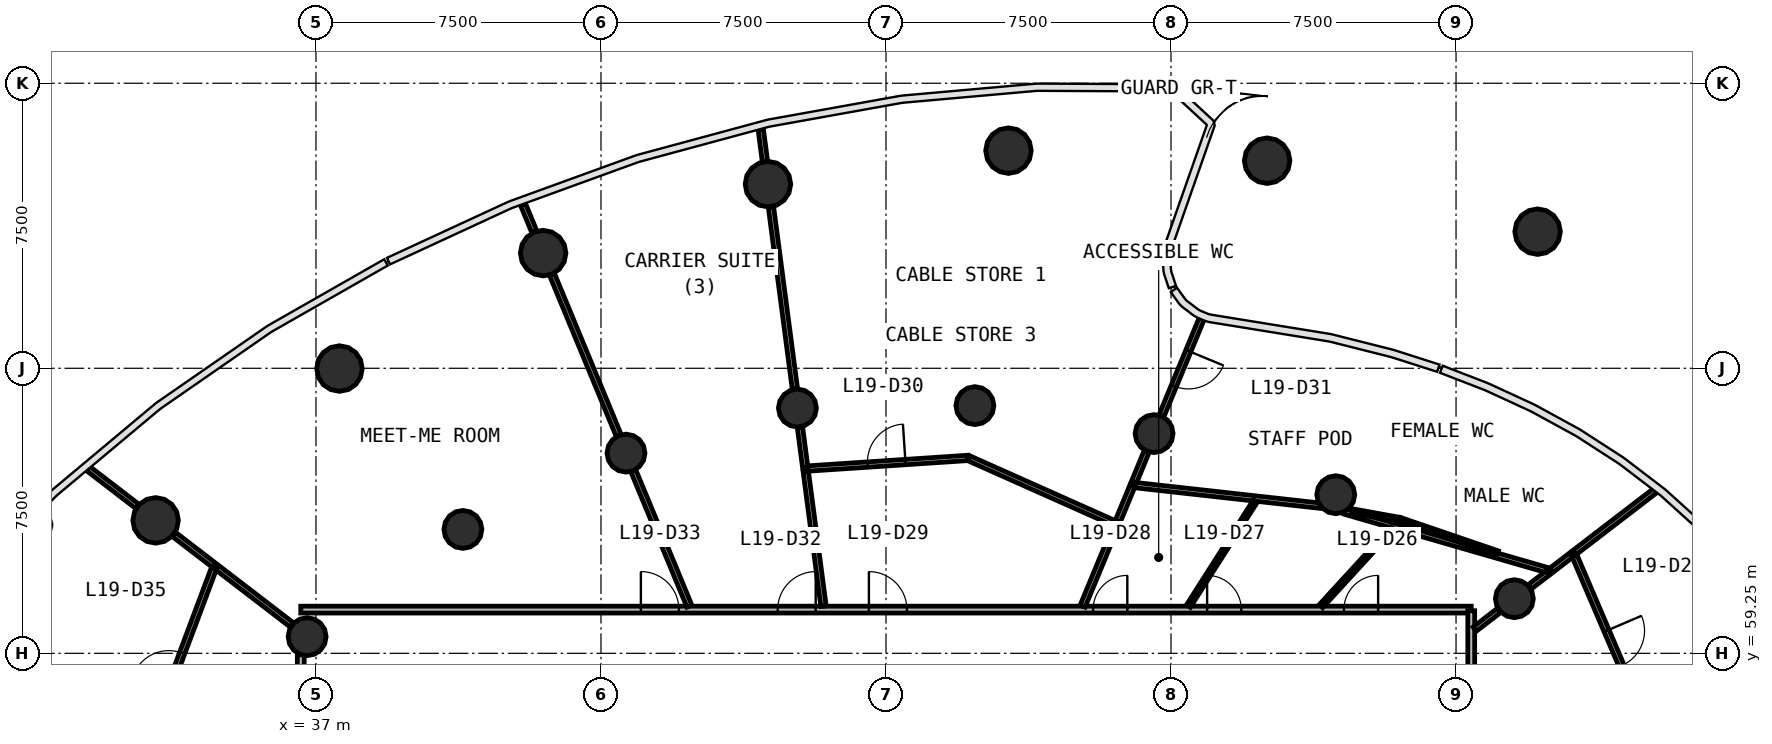
"""IFC4 building model, lengths in metres.
Left out: names, types, materials, properties, quantities, classifications, styles, units other than length and angle.
Written with IfcOpenShell. Run it as: python <this file> out.ifc"""

import sys

from ifc_helpers import new_model, si_unit, direction, frame, frame_2d, origin, origin_2d, place, context, subcontext, project, spatial, rectangle, circle, extrude, source, transform, mapped, element, fill, save


model = new_model("IFC4")
c1 = context("Model", 3, precision=1e-05, world=origin(), true_north=direction((0.0, 1.0)))
c2 = subcontext(c1, "Body", "Model", "MODEL_VIEW")
j1 = project(units=[si_unit("LENGTHUNIT", "METRE"), si_unit("PLANEANGLEUNIT", "RADIAN")], contexts=[c1])
p1 = place(None, origin())
s1 = spatial("IfcSite", under=j1, at=p1, CompositionType="ELEMENT")
p2 = place(p1, origin())
s2 = spatial("IfcBuilding", under=s1, at=p2, CompositionType="ELEMENT")
p3 = place(p2, frame((0.0, 0.0, 83.9)))
s3 = spatial("IfcBuildingStorey", under=s2, at=p3, CompositionType="ELEMENT", Elevation=83.9)
m1 = source(origin(), c2, "Body", "SweptSolid", [
    extrude(circle(Radius=0.6, at=origin_2d()), origin(), (0.0, 0.0, 1.0), 4.1),
])
for number, where, z_axis, x_axis in (
    (1, (69.146, 70.345, 0.0), (0.0, 0.0, 1.0), (1.0, 0.0, 0.0)),
    (2, (62.029, 72.212, 0.0), (0.0, 0.0, 1.0), (1.0, 0.0, 0.0)),
    (3, (55.222, 72.477, 0.0), (0.0, 0.0, 1.0), (1.0, 0.0, 0.0)),
    (4, (48.894, 71.595, 0.0), (0.0, 0.0, 1.0), (1.0, 0.0, 0.0)),
    (5, (42.978, 69.781, 0.0), (0.0, 0.0, 1.0), (1.0, 0.0, 0.0)),
    (6, (37.618, 66.743, 0.0), (0.0, 0.0, 1.0), (1.0, 0.0, 0.0)),
    (7, (32.78, 62.748, 0.0), (0.0, 0.0, 1.0), (1.0, 0.0, 0.0)),
):
    element("IfcColumn", number, at=place(p3, frame(where, z_axis=z_axis, x_axis=x_axis)), inside=s3, PredefinedType="COLUMN", context=c2, shape_type="MappedRepresentation", body=[
        mapped(m1, transform((0.0, 0.0, 0.0), scale=1.0)),
    ])
m2 = source(origin(), c2, "Body", "SweptSolid", [
    extrude(circle(Radius=0.5, at=origin_2d()), origin(), (0.0, 0.0, 1.0), 4.1),
])
for number, where, z_axis, x_axis in (
    (8, (68.535, 60.688, 0.0), (0.0, 0.0, 1.0), (1.0, 0.0, 0.0)),
    (9, (63.835, 63.424, 0.0), (0.0, 0.0, 1.0), (1.0, 0.0, 0.0)),
    (10, (59.055, 65.031, 0.0), (0.0, 0.0, 1.0), (1.0, 0.0, 0.0)),
    (11, (54.339, 65.767, 0.0), (0.0, 0.0, 1.0), (1.0, 0.0, 0.0)),
    (12, (49.669, 65.703, 0.0), (0.0, 0.0, 1.0), (1.0, 0.0, 0.0)),
    (13, (45.158, 64.518, 0.0), (0.0, 0.0, 1.0), (1.0, 0.0, 0.0)),
    (14, (40.866, 62.51, 0.0), (0.0, 0.0, 1.0), (1.0, 0.0, 0.0)),
    (15, (36.768, 59.688, 0.0), (0.0, 0.0, 1.0), (1.0, 0.0, 0.0)),
):
    element("IfcColumn", number, at=place(p3, frame(where, z_axis=z_axis, x_axis=x_axis)), inside=s3, PredefinedType="COLUMN", context=c2, shape_type="MappedRepresentation", body=[
        mapped(m2, transform((0.0, 0.0, 0.0), scale=1.0)),
    ])
p4 = place(p3, frame((36.6, 60.4, 0.0), z_axis=(0.0, 0.0, 1.0), x_axis=(1.0, 0.0, 0.0)))
e16 = element("IfcWall", 16, at=p4, inside=s3, PredefinedType="PARTITIONING", context=c2, shape_type="SweptSolid", body=[
    extrude(rectangle(XDim=30.8, YDim=0.18, at=frame_2d((15.4, 0.0))), origin(), (0.0, 0.0, 1.0), 2.9),
])
p5 = place(p4, frame((27.45, 0.0, 0.0)))
e17 = element("IfcOpeningElement", 17, at=p5, cuts=e16, PredefinedType="OPENING", context=c2, shape_type="SweptSolid", body=[
    extrude(rectangle(XDim=0.9, YDim=2.1, at=frame_2d((0.45, 1.05))), frame((0.0, 0.1, 0.0), z_axis=(0.0, -1.0, 0.0), x_axis=(1.0, 0.0, 0.0)), (0.0, 0.0, 1.0), 0.2),
])
p6 = place(p4, frame((23.85, 0.0, 0.0)))
e18 = element("IfcOpeningElement", 18, at=p6, cuts=e16, PredefinedType="OPENING", context=c2, shape_type="SweptSolid", body=[
    extrude(rectangle(XDim=0.9, YDim=2.1, at=frame_2d((0.45, 1.05))), frame((0.0, 0.1, 0.0), z_axis=(0.0, -1.0, 0.0), x_axis=(1.0, 0.0, 0.0)), (0.0, 0.0, 1.0), 0.2),
])
p7 = place(p4, frame((20.85, 0.0, 0.0)))
e19 = element("IfcOpeningElement", 19, at=p7, cuts=e16, PredefinedType="OPENING", context=c2, shape_type="SweptSolid", body=[
    extrude(rectangle(XDim=0.9, YDim=2.1, at=frame_2d((0.45, 1.05))), frame((0.0, 0.1, 0.0), z_axis=(0.0, -1.0, 0.0), x_axis=(1.0, 0.0, 0.0)), (0.0, 0.0, 1.0), 0.2),
])
p8 = place(p4, frame((14.95, 0.0, 0.0)))
e20 = element("IfcOpeningElement", 20, at=p8, cuts=e16, PredefinedType="OPENING", context=c2, shape_type="SweptSolid", body=[
    extrude(rectangle(XDim=1.0, YDim=2.1, at=frame_2d((0.5, 1.05))), frame((0.0, 0.1, 0.0), z_axis=(0.0, -1.0, 0.0), x_axis=(1.0, 0.0, 0.0)), (0.0, 0.0, 1.0), 0.2),
])
p9 = place(p4, frame((12.55, 0.0, 0.0)))
e21 = element("IfcOpeningElement", 21, at=p9, cuts=e16, PredefinedType="OPENING", context=c2, shape_type="SweptSolid", body=[
    extrude(rectangle(XDim=1.0, YDim=2.1, at=frame_2d((0.5, 1.05))), frame((0.0, 0.1, 0.0), z_axis=(0.0, -1.0, 0.0), x_axis=(1.0, 0.0, 0.0)), (0.0, 0.0, 1.0), 0.2),
])
p10 = place(p4, frame((8.95, 0.0, 0.0)))
e22 = element("IfcOpeningElement", 22, at=p10, cuts=e16, PredefinedType="OPENING", context=c2, shape_type="SweptSolid", body=[
    extrude(rectangle(XDim=1.0, YDim=2.1, at=frame_2d((0.5, 1.05))), frame((0.0, 0.1, 0.0), z_axis=(0.0, -1.0, 0.0), x_axis=(1.0, 0.0, 0.0)), (0.0, 0.0, 1.0), 0.2),
])
p11 = place(p3, frame((67.4, 60.37, 0.0), z_axis=(0.0, 0.0, 1.0), x_axis=(0.0, -1.0, 0.0)))
e23 = element("IfcWall", 23, at=p11, inside=s3, PredefinedType="PARTITIONING", context=c2, shape_type="SweptSolid", body=[
    extrude(rectangle(XDim=23.583, YDim=0.18, at=frame_2d((11.791, 0.0))), origin(), (0.0, 0.0, 1.0), 2.9),
])
p12 = place(p11, frame((9.133, 0.0, 0.0)))
e24 = element("IfcOpeningElement", 24, at=p12, cuts=e23, PredefinedType="OPENING", context=c2, shape_type="SweptSolid", body=[
    extrude(rectangle(XDim=1.0, YDim=2.1, at=frame_2d((0.5, 1.05))), frame((0.0, 0.1, 0.0), z_axis=(0.0, -1.0, 0.0), x_axis=(1.0, 0.0, 0.0)), (0.0, 0.0, 1.0), 0.2),
])
p13 = place(p11, frame((11.333, 0.0, 0.0)))
e25 = element("IfcOpeningElement", 25, at=p13, cuts=e23, PredefinedType="OPENING", context=c2, shape_type="SweptSolid", body=[
    extrude(rectangle(XDim=1.0, YDim=2.1, at=frame_2d((0.5, 1.05))), frame((0.0, 0.1, 0.0), z_axis=(0.0, -1.0, 0.0), x_axis=(1.0, 0.0, 0.0)), (0.0, 0.0, 1.0), 0.2),
])
p14 = place(p3, frame((36.6, 35.63, 0.0), z_axis=(0.0, 0.0, 1.0), x_axis=(0.0, 1.0, 0.0)))
e26 = element("IfcWall", 26, at=p14, inside=s3, PredefinedType="PARTITIONING", context=c2, shape_type="SweptSolid", body=[
    extrude(rectangle(XDim=23.583, YDim=0.18, at=frame_2d((11.791, 0.0))), origin(), (0.0, 0.0, 1.0), 2.9),
])
p15 = place(p14, frame((11.333, 0.0, 0.0)))
e27 = element("IfcOpeningElement", 27, at=p15, cuts=e26, PredefinedType="OPENING", context=c2, shape_type="SweptSolid", body=[
    extrude(rectangle(XDim=1.0, YDim=2.1, at=frame_2d((0.5, 1.05))), frame((0.0, 0.1, 0.0), z_axis=(0.0, -1.0, 0.0), x_axis=(1.0, 0.0, 0.0)), (0.0, 0.0, 1.0), 0.2),
])
p16 = place(p3, frame((32.316, 56.153, 0.0), z_axis=(0.0, 0.0, 1.0), x_axis=(0.35106774328, 0.936350062545, 0.0)))
e28 = element("IfcWall", 28, at=p16, inside=s3, PredefinedType="PARTITIONING", context=c2, shape_type="SweptSolid", body=[
    extrude(rectangle(XDim=5.764, YDim=0.14, at=frame_2d((2.882, 0.0))), origin(), (0.0, 0.0, 1.0), 2.9),
])
p17 = place(p16, frame((2.315, 0.0, 0.0)))
e29 = element("IfcOpeningElement", 29, at=p17, cuts=e28, PredefinedType="OPENING", context=c2, shape_type="SweptSolid", body=[
    extrude(rectangle(XDim=1.0, YDim=2.1, at=frame_2d((0.5, 1.05))), frame((0.0, 0.08, 0.0), z_axis=(0.0, -1.0, 0.0), x_axis=(1.0, 0.0, 0.0)), (0.0, 0.0, 1.0), 0.16),
])
p18 = place(p3, frame((69.483, 61.415, 0.0), z_axis=(0.0, 0.0, 1.0), x_axis=(-0.960703393741, 0.277576996982, 0.0)))
e30 = element("IfcWall", 30, at=p18, inside=s3, PredefinedType="PARTITIONING", context=c2, shape_type="SweptSolid", body=[
    extrude(rectangle(XDim=5.632, YDim=0.14, at=frame_2d((2.816, 0.0))), origin(), (0.0, 0.0, 1.0), 2.9),
])
p19 = place(p3, frame((70.089, 61.88, 0.0), z_axis=(0.0, 0.0, 1.0), x_axis=(0.393299181535, -0.919410546929, 0.0)))
e31 = element("IfcWall", 31, at=p19, inside=s3, PredefinedType="PARTITIONING", context=c2, shape_type="SweptSolid", body=[
    extrude(rectangle(XDim=5.465, YDim=0.14, at=frame_2d((2.732, 0.0))), origin(), (0.0, 0.0, 1.0), 2.9),
])
p20 = place(p19, frame((2.215, 0.0, 0.0)))
e32 = element("IfcOpeningElement", 32, at=p20, cuts=e31, PredefinedType="OPENING", context=c2, shape_type="SweptSolid", body=[
    extrude(rectangle(XDim=1.0, YDim=2.1, at=frame_2d((0.5, 1.05))), frame((0.0, 0.08, 0.0), z_axis=(0.0, -1.0, 0.0), x_axis=(1.0, 0.0, 0.0)), (0.0, 0.0, 1.0), 0.16),
])
p21 = place(p3, frame((63.422, 63.135, 0.0), z_axis=(0.0, 0.0, 1.0), x_axis=(-0.993871714134, 0.110539657341, 0.0)))
e33 = element("IfcWall", 33, at=p21, inside=s3, PredefinedType="PARTITIONING", context=c2, shape_type="SweptSolid", body=[
    extrude(rectangle(XDim=4.956, YDim=0.14, at=frame_2d((2.478, 0.0))), origin(), (0.0, 0.0, 1.0), 2.9),
])
p22 = place(p3, frame((49.604, 66.203, 0.0), z_axis=(0.0, 0.0, 1.0), x_axis=(-0.130552494248, 0.991441398291, 0.0)))
e34 = element("IfcWall", 34, at=p22, inside=s3, PredefinedType="PARTITIONING", context=c2, shape_type="SweptSolid", body=[
    extrude(rectangle(XDim=4.834, YDim=0.14, at=frame_2d((2.417, 0.0))), origin(), (0.0, 0.0, 1.0), 2.9),
])
p23 = place(p3, frame((44.965, 64.984, 0.0), z_axis=(0.0, 0.0, 1.0), x_axis=(-0.382705930348, 0.923870213221, 0.0)))
e35 = element("IfcWall", 35, at=p23, inside=s3, PredefinedType="PARTITIONING", context=c2, shape_type="SweptSolid", body=[
    extrude(rectangle(XDim=4.587, YDim=0.14, at=frame_2d((2.293, 0.0))), origin(), (0.0, 0.0, 1.0), 2.9),
])
p24 = place(p3, frame((49.879, 64.108, 0.0), z_axis=(0.0, 0.0, 1.0), x_axis=(0.997809026682, 0.066160005079, 0.0)))
e36 = element("IfcWall", 36, at=p24, inside=s3, PredefinedType="PARTITIONING", context=c2, shape_type="SweptSolid", body=[
    extrude(rectangle(XDim=4.288, YDim=0.14, at=frame_2d((2.144, 0.0))), origin(), (0.0, 0.0, 1.0), 2.9),
])
p25 = place(p24, frame((1.638, 0.0, 0.0)))
e37 = element("IfcOpeningElement", 37, at=p25, cuts=e36, PredefinedType="OPENING", context=c2, shape_type="SweptSolid", body=[
    extrude(rectangle(XDim=1.0, YDim=2.1, at=frame_2d((0.5, 1.05))), frame((0.0, 0.08, 0.0), z_axis=(0.0, -1.0, 0.0), x_axis=(1.0, 0.0, 0.0)), (0.0, 0.0, 1.0), 0.16),
])
p26 = place(p3, frame((58.068, 62.649, 0.0), z_axis=(0.0, 0.0, 1.0), x_axis=(-0.913353847003, 0.40716673509, 0.0)))
e38 = element("IfcWall", 38, at=p26, inside=s3, PredefinedType="PARTITIONING", context=c2, shape_type="SweptSolid", body=[
    extrude(rectangle(XDim=4.251, YDim=0.14, at=frame_2d((2.125, 0.0))), origin(), (0.0, 0.0, 1.0), 2.9),
])
p27 = place(p3, frame((46.826, 60.49, 0.0), z_axis=(0.0, 0.0, 1.0), x_axis=(-0.382644558062, 0.923895633817, 0.0)))
e39 = element("IfcWall", 39, at=p27, inside=s3, PredefinedType="PARTITIONING", context=c2, shape_type="SweptSolid", body=[
    extrude(rectangle(XDim=3.854, YDim=0.14, at=frame_2d((1.927, 0.0))), origin(), (0.0, 0.0, 1.0), 2.9),
])
p28 = place(p3, frame((33.26, 62.38, 0.0), z_axis=(0.0, 0.0, 1.0), x_axis=(0.793352561574, -0.608762443851, 0.0)))
e40 = element("IfcWall", 40, at=p28, inside=s3, PredefinedType="PARTITIONING", context=c2, shape_type="SweptSolid", body=[
    extrude(rectangle(XDim=1.332, YDim=0.14, at=frame_2d((0.666, 0.0))), origin(), (0.0, 0.0, 1.0), 2.9),
])
p29 = place(p3, frame((34.398, 61.506, 0.0), z_axis=(0.0, 0.0, 1.0), x_axis=(0.793365666671, -0.608745364621, 0.0)))
e41 = element("IfcWall", 41, at=p29, inside=s3, PredefinedType="PARTITIONING", context=c2, shape_type="SweptSolid", body=[
    extrude(rectangle(XDim=2.482, YDim=0.14, at=frame_2d((1.241, 0.0))), origin(), (0.0, 0.0, 1.0), 2.9),
])
p30 = place(p3, frame((50.356, 60.49, 0.0), z_axis=(0.0, 0.0, 1.0), x_axis=(-0.130563916161, 0.991439894193, 0.0)))
e42 = element("IfcWall", 42, at=p30, inside=s3, PredefinedType="PARTITIONING", context=c2, shape_type="SweptSolid", body=[
    extrude(rectangle(XDim=3.579, YDim=0.14, at=frame_2d((1.79, 0.0))), origin(), (0.0, 0.0, 1.0), 2.9),
])
p31 = place(p3, frame((60.312, 68.066, 0.0), z_axis=(0.0, 0.0, 1.0), x_axis=(-0.382706055611, -0.923870161331, 0.0)))
e43 = element("IfcWall", 43, at=p31, inside=s3, PredefinedType="PARTITIONING", context=c2, shape_type="SweptSolid", body=[
    extrude(rectangle(XDim=2.78, YDim=0.14, at=frame_2d((1.39, 0.0))), origin(), (0.0, 0.0, 1.0), 2.9),
])
p32 = place(p31, frame((0.929, 0.0, 0.0)))
e44 = element("IfcOpeningElement", 44, at=p32, cuts=e43, PredefinedType="OPENING", context=c2, shape_type="SweptSolid", body=[
    extrude(rectangle(XDim=1.0, YDim=2.1, at=frame_2d((0.5, 1.05))), frame((0.0, 0.08, 0.0), z_axis=(0.0, -1.0, 0.0), x_axis=(1.0, 0.0, 0.0)), (0.0, 0.0, 1.0), 0.16),
])
p33 = place(p3, frame((70.113, 61.898, 0.0), z_axis=(0.0, 0.0, 1.0), x_axis=(0.793370018498, 0.608739692931, 0.0)))
e45 = element("IfcWall", 45, at=p33, inside=s3, PredefinedType="PARTITIONING", context=c2, shape_type="SweptSolid", body=[
    extrude(rectangle(XDim=2.711, YDim=0.14, at=frame_2d((1.355, 0.0))), origin(), (0.0, 0.0, 1.0), 2.9),
])
p34 = place(p3, frame((57.174, 60.49, 0.0), z_axis=(0.0, 0.0, 1.0), x_axis=(0.382622885098, 0.923904609686, 0.0)))
e46 = element("IfcWall", 46, at=p34, inside=s3, PredefinedType="PARTITIONING", context=c2, shape_type="SweptSolid", body=[
    extrude(rectangle(XDim=2.307, YDim=0.14, at=frame_2d((1.153, 0.0))), origin(), (0.0, 0.0, 1.0), 2.9),
])
p35 = place(p3, frame((58.861, 64.565, 0.0), z_axis=(0.0, 0.0, 1.0), x_axis=(-0.38276732447, -0.923844778801, 0.0)))
e47 = element("IfcWall", 47, at=p35, inside=s3, PredefinedType="PARTITIONING", context=c2, shape_type="SweptSolid", body=[
    extrude(rectangle(XDim=0.882, YDim=0.14, at=frame_2d((0.441, 0.0))), origin(), (0.0, 0.0, 1.0), 2.9),
])
p36 = place(p3, frame((58.484, 63.655, 0.0), z_axis=(0.0, 0.0, 1.0), x_axis=(-0.382640996584, -0.923897108846, 0.0)))
e48 = element("IfcWall", 48, at=p36, inside=s3, PredefinedType="PARTITIONING", context=c2, shape_type="SweptSolid", body=[
    extrude(rectangle(XDim=1.019, YDim=0.14, at=frame_2d((0.51, 0.0))), origin(), (0.0, 0.0, 1.0), 2.9),
])
p37 = place(p3, frame((32.301, 63.116, 0.0), z_axis=(0.0, 0.0, 1.0), x_axis=(-0.793364464168, 0.608746931816, 0.0)))
e49 = element("IfcWall", 49, at=p37, inside=s3, PredefinedType="PARTITIONING", context=c2, shape_type="SweptSolid", body=[
    extrude(rectangle(XDim=1.641, YDim=0.14, at=frame_2d((0.821, 0.0))), origin(), (0.0, 0.0, 1.0), 2.9),
])
p38 = place(p3, frame((49.875, 64.137, 0.0), z_axis=(0.0, 0.0, 1.0), x_axis=(-0.130601397608, 0.991434957495, 0.0)))
e50 = element("IfcWall", 50, at=p38, inside=s3, PredefinedType="PARTITIONING", context=c2, shape_type="SweptSolid", body=[
    extrude(rectangle(XDim=1.075, YDim=0.14, at=frame_2d((0.538, 0.0))), origin(), (0.0, 0.0, 1.0), 2.9),
])
p39 = place(p3, frame((67.49, 59.886, 0.0), z_axis=(0.0, 0.0, 1.0), x_axis=(0.793316076519, 0.608809989025, 0.0)))
e51 = element("IfcWall", 51, at=p39, inside=s3, PredefinedType="PARTITIONING", context=c2, shape_type="SweptSolid", body=[
    extrude(rectangle(XDim=0.812, YDim=0.14, at=frame_2d((0.406, 0.0))), origin(), (0.0, 0.0, 1.0), 2.9),
])
p40 = place(p3, frame((48.815, 72.195, 0.0), z_axis=(0.0, 0.0, 1.0), x_axis=(-0.130343356352, 0.991468915022, 0.0)))
e52 = element("IfcWall", 52, at=p40, inside=s3, PredefinedType="PARTITIONING", context=c2, shape_type="SweptSolid", body=[
    extrude(rectangle(XDim=0.852, YDim=0.14, at=frame_2d((0.426, 0.0))), origin(), (0.0, 0.0, 1.0), 2.9),
])
p41 = place(p3, frame((42.747, 70.34, 0.0), z_axis=(0.0, 0.0, 1.0), x_axis=(-0.382698732017, 0.92387319504, 0.0)))
e53 = element("IfcWall", 53, at=p41, inside=s3, PredefinedType="PARTITIONING", context=c2, shape_type="SweptSolid", body=[
    extrude(rectangle(XDim=0.787, YDim=0.14, at=frame_2d((0.394, 0.0))), origin(), (0.0, 0.0, 1.0), 2.9),
])
p42 = place(p3, frame((69.506, 61.433, 0.0), z_axis=(0.0, 0.0, 1.0), x_axis=(0.793404561432, 0.608694670504, 0.0)))
e54 = element("IfcWall", 54, at=p42, inside=s3, PredefinedType="PARTITIONING", context=c2, shape_type="SweptSolid", body=[
    extrude(rectangle(XDim=0.662, YDim=0.14, at=frame_2d((0.331, 0.0))), origin(), (0.0, 0.0, 1.0), 2.9),
])
p43 = place(p3, frame((68.935, 60.995, 0.0), z_axis=(0.0, 0.0, 1.0), x_axis=(0.79334569595, 0.608771391178, 0.0)))
e55 = element("IfcWall", 55, at=p43, inside=s3, PredefinedType="PARTITIONING", context=c2, shape_type="SweptSolid", body=[
    extrude(rectangle(XDim=0.603, YDim=0.14, at=frame_2d((0.302, 0.0))), origin(), (0.0, 0.0, 1.0), 2.9),
])
p44 = place(p3, frame((68.094, 61.889, 0.0), z_axis=(0.0, 0.0, 1.0), x_axis=(-0.946388818608, 0.323029726207, 0.0)))
e56 = element("IfcWall", 56, at=p44, inside=s3, PredefinedType="PARTITIONING", context=c2, shape_type="SweptSolid", body=[
    extrude(rectangle(XDim=2.71, YDim=0.12, at=frame_2d((1.355, 0.0))), origin(), (0.0, 0.0, 1.0), 2.9),
])
p45 = place(p3, frame((59.957, 60.49, 0.0), z_axis=(0.0, 0.0, 1.0), x_axis=(0.537318932705, 0.843379134528, 0.0)))
e57 = element("IfcWall", 57, at=p45, inside=s3, PredefinedType="PARTITIONING", context=c2, shape_type="SweptSolid", body=[
    extrude(rectangle(XDim=3.277, YDim=0.12, at=frame_2d((1.638, 0.0))), origin(), (0.0, 0.0, 1.0), 2.9),
])
p46 = place(p3, frame((63.445, 60.49, 0.0), z_axis=(0.0, 0.0, 1.0), x_axis=(0.675613442785, 0.737256045027, 0.0)))
e58 = element("IfcWall", 58, at=p46, inside=s3, PredefinedType="PARTITIONING", context=c2, shape_type="SweptSolid", body=[
    extrude(rectangle(XDim=2.784, YDim=0.12, at=frame_2d((1.392, 0.0))), origin(), (0.0, 0.0, 1.0), 2.9),
])
p47 = place(p3, frame((65.5, 62.77, 0.0), z_axis=(0.0, 0.0, 1.0), x_axis=(-0.983942088999, 0.178487998184, 0.0)))
e59 = element("IfcWall", 59, at=p47, inside=s3, PredefinedType="PARTITIONING", context=c2, shape_type="SweptSolid", body=[
    extrude(rectangle(XDim=1.243, YDim=0.12, at=frame_2d((0.622, 0.0))), origin(), (0.0, 0.0, 1.0), 2.9),
])
m3 = source(origin(), c2, "Body", "SweptSolid", [
    extrude(rectangle(XDim=1.0, YDim=2.1, at=frame_2d((0.5, 1.05))), frame((0.0, 0.025, 0.0), z_axis=(0.0, -1.0, 0.0), x_axis=(1.0, 0.0, 0.0)), (0.0, 0.0, 1.0), 0.05),
])
p48 = place(p20, origin())
e60 = element("IfcDoor", 60, at=p48, inside=s3, OperationType="SINGLE_SWING_LEFT", PredefinedType="DOOR", context=c2, shape_type="MappedRepresentation", body=[
    mapped(m3, transform((0.0, 0.0, 0.0), scale=1.0)),
])
fill(e32, e60)
m4 = source(origin(), c2, "Body", "SweptSolid", [
    extrude(rectangle(XDim=0.9, YDim=2.1, at=frame_2d((0.45, 1.05))), frame((0.0, 0.025, 0.0), z_axis=(0.0, -1.0, 0.0), x_axis=(1.0, 0.0, 0.0)), (0.0, 0.0, 1.0), 0.05),
])
p49 = place(p5, origin())
e61 = element("IfcDoor", 61, at=p49, inside=s3, OperationType="SINGLE_SWING_RIGHT", PredefinedType="DOOR", context=c2, shape_type="MappedRepresentation", body=[
    mapped(m4, transform((0.0, 0.0, 0.0), scale=1.0)),
])
fill(e17, e61)
p50 = place(p6, origin())
e62 = element("IfcDoor", 62, at=p50, inside=s3, OperationType="SINGLE_SWING_LEFT", PredefinedType="DOOR", context=c2, shape_type="MappedRepresentation", body=[
    mapped(m4, transform((0.0, 0.0, 0.0), scale=1.0)),
])
fill(e18, e62)
p51 = place(p7, origin())
e63 = element("IfcDoor", 63, at=p51, inside=s3, OperationType="SINGLE_SWING_RIGHT", PredefinedType="DOOR", context=c2, shape_type="MappedRepresentation", body=[
    mapped(m4, transform((0.0, 0.0, 0.0), scale=1.0)),
])
fill(e19, e63)
p52 = place(p8, origin())
e64 = element("IfcDoor", 64, at=p52, inside=s3, OperationType="SINGLE_SWING_LEFT", PredefinedType="DOOR", context=c2, shape_type="MappedRepresentation", body=[
    mapped(m3, transform((0.0, 0.0, 0.0), scale=1.0)),
])
fill(e20, e64)
p53 = place(p25, origin())
e65 = element("IfcDoor", 65, at=p53, inside=s3, OperationType="SINGLE_SWING_RIGHT", PredefinedType="DOOR", context=c2, shape_type="MappedRepresentation", body=[
    mapped(m3, transform((0.0, 0.0, 0.0), scale=1.0)),
])
fill(e37, e65)
p54 = place(p32, origin())
e66 = element("IfcDoor", 66, at=p54, inside=s3, OperationType="SINGLE_SWING_LEFT", PredefinedType="DOOR", context=c2, shape_type="MappedRepresentation", body=[
    mapped(m3, transform((0.0, 0.0, 0.0), scale=1.0)),
])
fill(e44, e66)
p55 = place(p9, origin())
e67 = element("IfcDoor", 67, at=p55, inside=s3, OperationType="SINGLE_SWING_RIGHT", PredefinedType="DOOR", context=c2, shape_type="MappedRepresentation", body=[
    mapped(m3, transform((0.0, 0.0, 0.0), scale=1.0)),
])
fill(e21, e67)
p56 = place(p10, origin())
e68 = element("IfcDoor", 68, at=p56, inside=s3, OperationType="SINGLE_SWING_LEFT", PredefinedType="DOOR", context=c2, shape_type="MappedRepresentation", body=[
    mapped(m3, transform((0.0, 0.0, 0.0), scale=1.0)),
])
fill(e22, e68)
p57 = place(p17, origin())
e69 = element("IfcDoor", 69, at=p57, inside=s3, OperationType="SINGLE_SWING_LEFT", PredefinedType="DOOR", context=c2, shape_type="MappedRepresentation", body=[
    mapped(m3, transform((0.0, 0.0, 0.0), scale=1.0)),
])
fill(e29, e69)
save(model, sys.argv[1])
